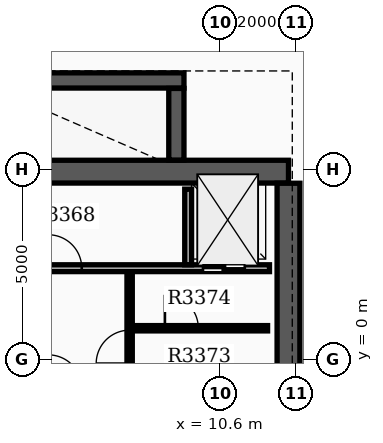
"""IFC4 building model, lengths in metres.
Left out: names, types, materials, properties, quantities, classifications, styles, units other than length and angle.
Written with IfcOpenShell. Run it as: python <this file> out.ifc"""

import sys

from ifc_helpers import new_model, si_unit, direction, frame, frame_2d, origin, place, context, subcontext, project, spatial, rectangle, extrude, element, fill, save


model = new_model("IFC4")
c1 = context("Model", 3, precision=1e-05, world=origin(), true_north=direction((0.0, 1.0)))
c2 = subcontext(c1, "Body", "Model", "MODEL_VIEW")
j1 = project(units=[si_unit("LENGTHUNIT", "METRE"), si_unit("PLANEANGLEUNIT", "RADIAN")], contexts=[c1])
p1 = place(None, origin())
s1 = spatial("IfcSite", under=j1, at=p1, CompositionType="ELEMENT")
p2 = place(p1, origin())
s2 = spatial("IfcBuilding", under=s1, at=p2, CompositionType="ELEMENT")
p3 = place(p2, frame((0.0, 0.0, 213.0)))
s3 = spatial("IfcBuildingStorey", under=s2, at=p3, CompositionType="ELEMENT", Elevation=213.0)
p4 = place(p3, frame((4.0, 4.95, 0.0), z_axis=(0.0, 0.0, 1.0), x_axis=(1.0, 0.0, 0.0)))
e1 = element("IfcWall", 1, at=p4, inside=s3, PredefinedType="SHEAR", context=c2, shape_type="SweptSolid", body=[
    extrude(rectangle(XDim=8.4, YDim=0.6, at=frame_2d((4.2, 0.0))), origin(), (0.0, 0.0, 1.0), 3.7),
])
p5 = place(p3, frame((12.4, -6.545, 0.0), z_axis=(0.0, 0.0, 1.0), x_axis=(0.0, 1.0, 0.0)))
e2 = element("IfcWall", 2, at=p5, inside=s3, PredefinedType="SHEAR", context=c2, shape_type="SweptSolid", body=[
    extrude(rectangle(XDim=11.19, YDim=0.6, at=frame_2d((5.595, 0.0))), origin(), (0.0, 0.0, 1.0), 3.7),
])
p6 = place(p3, frame((4.25, 7.35, 0.0), z_axis=(0.0, 0.0, 1.0), x_axis=(1.0, 0.0, 0.0)))
e3 = element("IfcWall", 3, at=p6, inside=s3, PredefinedType="SHEAR", context=c2, shape_type="SweptSolid", body=[
    extrude(rectangle(XDim=5.4, YDim=0.4, at=frame_2d((2.7, 0.0))), origin(), (0.0, 0.0, 1.0), 3.7),
])
p7 = place(p3, frame((9.45, 5.255, 0.0), z_axis=(0.0, 0.0, 1.0), x_axis=(0.0, 1.0, 0.0)))
e4 = element("IfcWall", 4, at=p7, inside=s3, PredefinedType="SHEAR", context=c2, shape_type="SweptSolid", body=[
    extrude(rectangle(XDim=1.885, YDim=0.4, at=frame_2d((0.942, 0.0))), origin(), (0.0, 0.0, 1.0), 3.7),
])
p8 = place(p3, frame((4.48, 2.41, 0.0), z_axis=(0.0, 0.0, 1.0), x_axis=(1.0, 0.0, 0.0)))
e5 = element("IfcWall", 5, at=p8, inside=s3, PredefinedType="SOLIDWALL", context=c2, shape_type="SweptSolid", body=[
    extrude(rectangle(XDim=7.42, YDim=0.18, at=frame_2d((3.71, 0.0))), origin(), (0.0, 0.0, 1.0), 3.17),
])
p9 = place(p8, frame((5.67, 0.0, 0.0)))
e6 = element("IfcOpeningElement", 6, at=p9, cuts=e5, PredefinedType="OPENING", context=c2, shape_type="SweptSolid", body=[
    extrude(rectangle(XDim=1.1, YDim=2.15, at=frame_2d((0.55, 1.075))), frame((0.0, 0.1, 0.0), z_axis=(0.0, -1.0, 0.0), x_axis=(1.0, 0.0, 0.0)), (0.0, 0.0, 1.0), 0.2),
])
p10 = place(p8, frame((1.6, 0.0, 0.0)))
e7 = element("IfcOpeningElement", 7, at=p10, cuts=e5, PredefinedType="OPENING", context=c2, shape_type="SweptSolid", body=[
    extrude(rectangle(XDim=0.88, YDim=2.1, at=frame_2d((0.44, 1.05))), frame((0.0, 0.1, 0.0), z_axis=(0.0, -1.0, 0.0), x_axis=(1.0, 0.0, 0.0)), (0.0, 0.0, 1.0), 0.2),
])
p11 = place(p3, frame((9.76, 2.5, 0.0), z_axis=(0.0, 0.0, 1.0), x_axis=(0.0, 1.0, 0.0)))
e8 = element("IfcWall", 8, at=p11, inside=s3, PredefinedType="SOLIDWALL", context=c2, shape_type="SweptSolid", body=[
    extrude(rectangle(XDim=1.99, YDim=0.18, at=frame_2d((0.995, 0.0))), origin(), (0.0, 0.0, 1.0), 3.17),
])
p12 = place(p3, frame((8.22, -0.65, 0.0), z_axis=(0.0, 0.0, 1.0), x_axis=(0.0, 1.0, 0.0)))
e9 = element("IfcWall", 9, at=p12, inside=s3, PredefinedType="SOLIDWALL", context=c2, shape_type="SweptSolid", body=[
    extrude(rectangle(XDim=2.96, YDim=0.14, at=frame_2d((1.48, 0.0))), origin(), (0.0, 0.0, 1.0), 3.17),
])
p13 = place(p12, frame((0.55, 0.0, 0.0)))
e10 = element("IfcOpeningElement", 10, at=p13, cuts=e9, PredefinedType="OPENING", context=c2, shape_type="SweptSolid", body=[
    extrude(rectangle(XDim=0.88, YDim=2.1, at=frame_2d((0.44, 1.05))), frame((0.0, 0.08, 0.0), z_axis=(0.0, -1.0, 0.0), x_axis=(1.0, 0.0, 0.0)), (0.0, 0.0, 1.0), 0.16),
])
p14 = place(p3, frame((8.298, 0.83, 0.0), z_axis=(0.0, 0.0, 1.0), x_axis=(1.0, 0.0, 0.0)))
e11 = element("IfcWall", 11, at=p14, inside=s3, PredefinedType="PARTITIONING", context=c2, shape_type="SweptSolid", body=[
    extrude(rectangle(XDim=3.552, YDim=0.14, at=frame_2d((1.776, 0.0))), origin(), (0.0, 0.0, 1.0), 3.17),
])
p15 = place(p14, frame((0.85, 0.0, 0.0)))
e12 = element("IfcOpeningElement", 12, at=p15, cuts=e11, PredefinedType="OPENING", context=c2, shape_type="SweptSolid", body=[
    extrude(rectangle(XDim=0.88, YDim=2.1, at=frame_2d((0.44, 1.05))), frame((0.0, 0.08, 0.0), z_axis=(0.0, -1.0, 0.0), x_axis=(1.0, 0.0, 0.0)), (0.0, 0.0, 1.0), 0.16),
])
p16 = place(p9, origin())
e13 = element("IfcDoor", 13, at=p16, inside=s3, OperationType="DOUBLE_DOOR_SLIDING", PredefinedType="DOOR", context=c2, shape_type="SweptSolid", body=[
    extrude(rectangle(XDim=1.1, YDim=2.15, at=frame_2d((0.55, 1.075))), frame((0.0, 0.025, 0.0), z_axis=(0.0, -1.0, 0.0), x_axis=(1.0, 0.0, 0.0)), (0.0, 0.0, 1.0), 0.05),
])
fill(e6, e13)
p17 = place(p10, origin())
e14 = element("IfcDoor", 14, at=p17, inside=s3, OperationType="SINGLE_SWING_LEFT", PredefinedType="DOOR", context=c2, shape_type="SweptSolid", body=[
    extrude(rectangle(XDim=0.88, YDim=2.1, at=frame_2d((0.44, 1.05))), frame((0.0, 0.025, 0.0), z_axis=(0.0, -1.0, 0.0), x_axis=(1.0, 0.0, 0.0)), (0.0, 0.0, 1.0), 0.05),
])
fill(e7, e14)
p18 = place(p13, origin())
e15 = element("IfcDoor", 15, at=p18, inside=s3, OperationType="SINGLE_SWING_LEFT", PredefinedType="DOOR", context=c2, shape_type="SweptSolid", body=[
    extrude(rectangle(XDim=0.88, YDim=2.1, at=frame_2d((0.44, 1.05))), frame((0.0, 0.025, 0.0), z_axis=(0.0, -1.0, 0.0), x_axis=(1.0, 0.0, 0.0)), (0.0, 0.0, 1.0), 0.05),
])
fill(e10, e15)
p19 = place(p15, origin())
e16 = element("IfcDoor", 16, at=p19, inside=s3, OperationType="SINGLE_SWING_LEFT", PredefinedType="DOOR", context=c2, shape_type="SweptSolid", body=[
    extrude(rectangle(XDim=0.88, YDim=2.1, at=frame_2d((0.44, 1.05))), frame((0.0, 0.025, 0.0), z_axis=(0.0, -1.0, 0.0), x_axis=(1.0, 0.0, 0.0)), (0.0, 0.0, 1.0), 0.05),
])
fill(e12, e16)
save(model, sys.argv[1])
